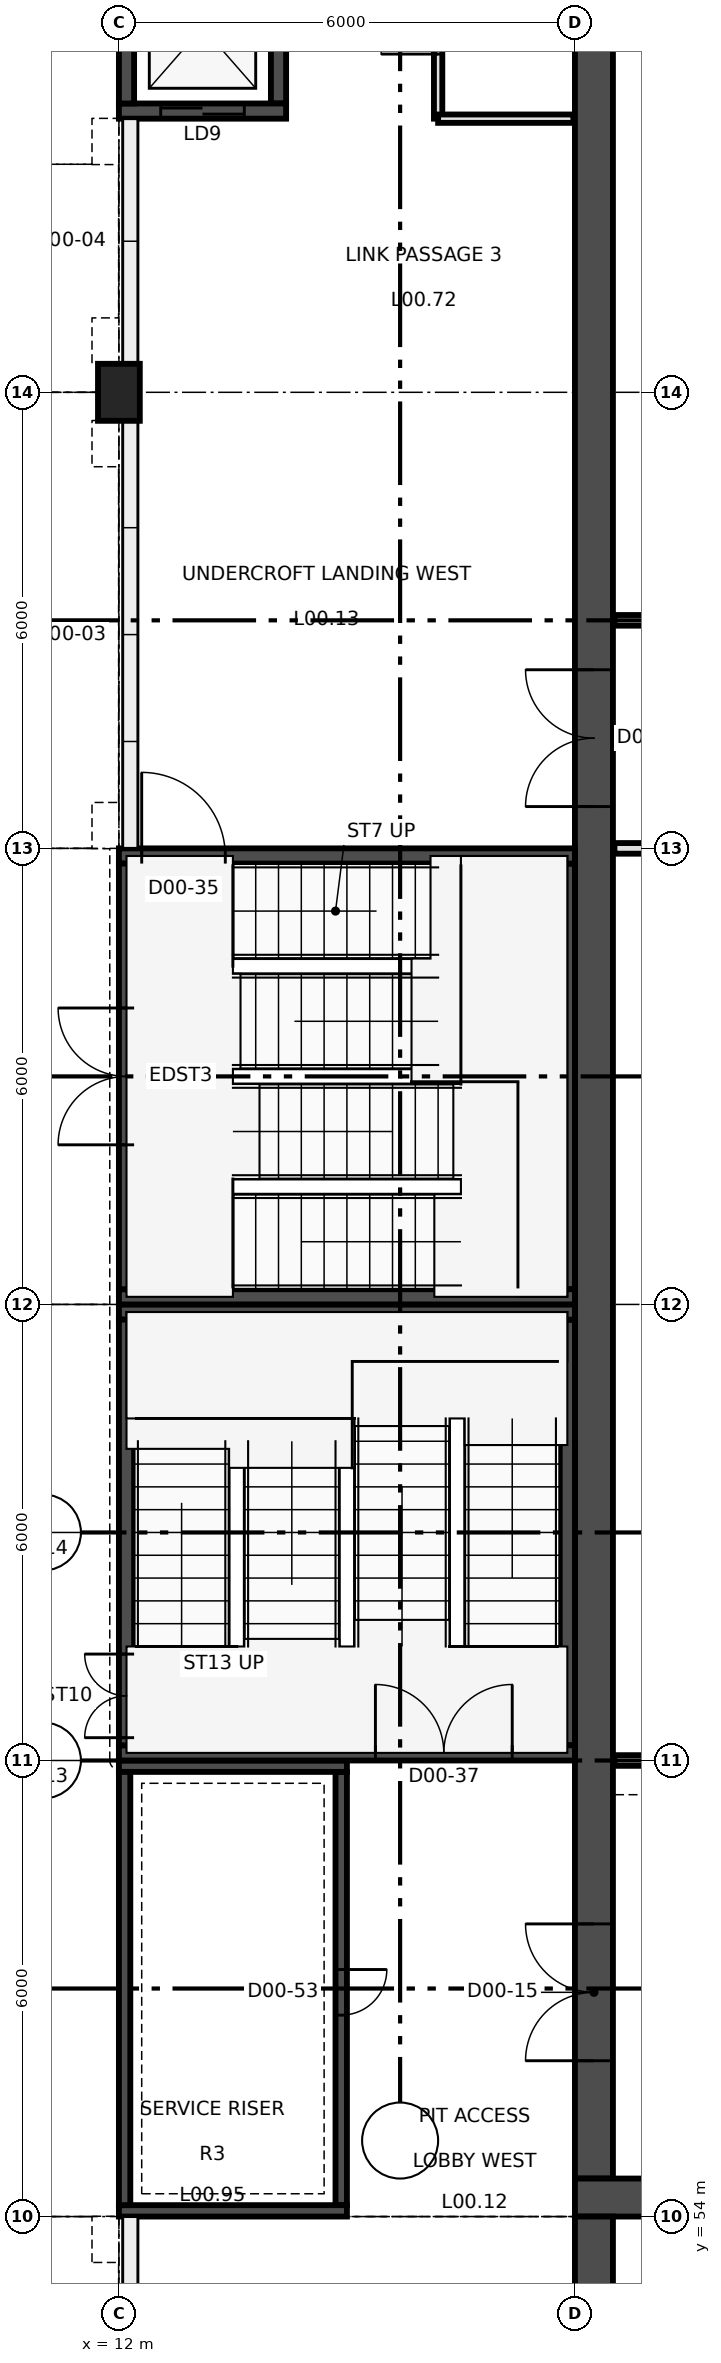
"""IFC4 building model, lengths in metres.
Left out: names, types, materials, properties, quantities, classifications, styles, units other than length and angle.
Written with IfcOpenShell. Run it as: python <this file> out.ifc"""

import sys

from ifc_helpers import new_model, si_unit, direction, frame, frame_2d, origin, origin_2d, place, context, subcontext, project, spatial, rectangle, extrude, element, fill, save


model = new_model("IFC4")
c1 = context("Model", 3, precision=1e-05, world=origin(), true_north=direction((0.0, 1.0)))
c2 = subcontext(c1, "Body", "Model", "MODEL_VIEW")
j1 = project(units=[si_unit("LENGTHUNIT", "METRE"), si_unit("PLANEANGLEUNIT", "RADIAN")], contexts=[c1])
p1 = place(None, origin())
s1 = spatial("IfcSite", under=j1, at=p1, CompositionType="ELEMENT")
p2 = place(p1, origin())
s2 = spatial("IfcBuilding", under=s1, at=p2, CompositionType="ELEMENT")
p3 = place(p2, origin())
s3 = spatial("IfcBuildingStorey", under=s2, at=p3, CompositionType="ELEMENT", Elevation=0.0)
p4 = place(p3, frame((12.0, 78.0, -0.3), z_axis=(0.0, 0.0, 1.0), x_axis=(1.0, 0.0, 0.0)))
e1 = element("IfcColumn", 1, at=p4, inside=s3, PredefinedType="COLUMN", context=c2, shape_type="SweptSolid", body=[
    extrude(rectangle(XDim=0.55, YDim=0.75, at=origin_2d()), origin(), (0.0, 0.0, 1.0), 7.3),
])
p5 = place(p3, frame((12.0, 71.9, -0.3), z_axis=(0.0, 0.0, 1.0), x_axis=(1.0, 0.0, 0.0)))
e2 = element("IfcWall", 2, at=p5, inside=s3, PredefinedType="SHEAR", context=c2, shape_type="SweptSolid", body=[
    extrude(rectangle(XDim=6.0, YDim=0.2, at=frame_2d((3.0, 0.0))), origin(), (0.0, 0.0, 1.0), 7.3),
])
p6 = place(p5, frame((0.3, 0.0, 0.3)))
e3 = element("IfcOpeningElement", 3, at=p6, cuts=e2, PredefinedType="OPENING", context=c2, shape_type="SweptSolid", body=[
    extrude(rectangle(XDim=1.1, YDim=2.2, at=frame_2d((0.55, 1.1))), frame((0.0, 0.11, 0.0), z_axis=(0.0, -1.0, 0.0), x_axis=(1.0, 0.0, 0.0)), (0.0, 0.0, 1.0), 0.22),
])
p7 = place(p3, frame((12.0, 66.1, -0.3), z_axis=(0.0, 0.0, 1.0), x_axis=(1.0, 0.0, 0.0)))
e4 = element("IfcWall", 4, at=p7, inside=s3, PredefinedType="SHEAR", context=c2, shape_type="SweptSolid", body=[
    extrude(rectangle(XDim=6.0, YDim=0.2, at=frame_2d((3.0, 0.0))), origin(), (0.0, 0.0, 1.0), 7.3),
])
p8 = place(p3, frame((12.1, 66.2, -0.3), z_axis=(0.0, 0.0, 1.0), x_axis=(0.0, 1.0, 0.0)))
e5 = element("IfcWall", 5, at=p8, inside=s3, PredefinedType="SHEAR", context=c2, shape_type="SweptSolid", body=[
    extrude(rectangle(XDim=5.6, YDim=0.2, at=frame_2d((2.8, 0.0))), origin(), (0.0, 0.0, 1.0), 7.3),
])
p9 = place(p8, frame((1.9, 0.0, 0.3)))
e6 = element("IfcOpeningElement", 6, at=p9, cuts=e5, PredefinedType="OPENING", context=c2, shape_type="SweptSolid", body=[
    extrude(rectangle(XDim=1.8, YDim=2.4, at=frame_2d((0.9, 1.2))), frame((0.0, 0.11, 0.0), z_axis=(0.0, -1.0, 0.0), x_axis=(1.0, 0.0, 0.0)), (0.0, 0.0, 1.0), 0.22),
])
p10 = place(p3, frame((17.9, 66.2, -0.3), z_axis=(0.0, 0.0, 1.0), x_axis=(0.0, 1.0, 0.0)))
e7 = element("IfcWall", 7, at=p10, inside=s3, PredefinedType="SHEAR", context=c2, shape_type="SweptSolid", body=[
    extrude(rectangle(XDim=5.6, YDim=0.2, at=frame_2d((2.8, 0.0))), origin(), (0.0, 0.0, 1.0), 7.3),
])
p11 = place(p3, frame((12.0, 65.9, -0.3), z_axis=(0.0, 0.0, 1.0), x_axis=(1.0, 0.0, 0.0)))
e8 = element("IfcWall", 8, at=p11, inside=s3, PredefinedType="SHEAR", context=c2, shape_type="SweptSolid", body=[
    extrude(rectangle(XDim=6.0, YDim=0.2, at=frame_2d((3.0, 0.0))), origin(), (0.0, 0.0, 1.0), 7.3),
])
p12 = place(p3, frame((12.0, 60.1, -0.3), z_axis=(0.0, 0.0, 1.0), x_axis=(1.0, 0.0, 0.0)))
e9 = element("IfcWall", 9, at=p12, inside=s3, PredefinedType="SHEAR", context=c2, shape_type="SweptSolid", body=[
    extrude(rectangle(XDim=6.0, YDim=0.2, at=frame_2d((3.0, 0.0))), origin(), (0.0, 0.0, 1.0), 7.3),
])
p13 = place(p12, frame((3.375, 0.0, 0.3)))
e10 = element("IfcOpeningElement", 10, at=p13, cuts=e9, PredefinedType="OPENING", context=c2, shape_type="SweptSolid", body=[
    extrude(rectangle(XDim=1.8, YDim=2.2, at=frame_2d((0.9, 1.1))), frame((0.0, 0.11, 0.0), z_axis=(0.0, -1.0, 0.0), x_axis=(1.0, 0.0, 0.0)), (0.0, 0.0, 1.0), 0.22),
])
p14 = place(p3, frame((12.1, 60.2, -0.3), z_axis=(0.0, 0.0, 1.0), x_axis=(0.0, 1.0, 0.0)))
e11 = element("IfcWall", 11, at=p14, inside=s3, PredefinedType="SHEAR", context=c2, shape_type="SweptSolid", body=[
    extrude(rectangle(XDim=5.6, YDim=0.2, at=frame_2d((2.8, 0.0))), origin(), (0.0, 0.0, 1.0), 7.3),
])
p15 = place(p14, frame((0.1, 0.0, 0.3)))
e12 = element("IfcOpeningElement", 12, at=p15, cuts=e11, PredefinedType="OPENING", context=c2, shape_type="SweptSolid", body=[
    extrude(rectangle(XDim=1.1, YDim=2.4, at=frame_2d((0.55, 1.2))), frame((0.0, 0.11, 0.0), z_axis=(0.0, -1.0, 0.0), x_axis=(1.0, 0.0, 0.0)), (0.0, 0.0, 1.0), 0.22),
])
p16 = place(p3, frame((17.9, 60.2, -0.3), z_axis=(0.0, 0.0, 1.0), x_axis=(0.0, 1.0, 0.0)))
e13 = element("IfcWall", 13, at=p16, inside=s3, PredefinedType="SHEAR", context=c2, shape_type="SweptSolid", body=[
    extrude(rectangle(XDim=5.6, YDim=0.2, at=frame_2d((2.8, 0.0))), origin(), (0.0, 0.0, 1.0), 7.3),
])
p17 = place(p3, frame((12.0, 81.7, -1.4), z_axis=(0.0, 0.0, 1.0), x_axis=(1.0, 0.0, 0.0)))
e14 = element("IfcWall", 14, at=p17, inside=s3, PredefinedType="SHEAR", context=c2, shape_type="SweptSolid", body=[
    extrude(rectangle(XDim=2.2, YDim=0.2, at=frame_2d((1.1, 0.0))), origin(), (0.0, 0.0, 1.0), 8.4),
])
p18 = place(p17, frame((0.55, 0.0, 1.4)))
e15 = element("IfcOpeningElement", 15, at=p18, cuts=e14, PredefinedType="OPENING", context=c2, shape_type="SweptSolid", body=[
    extrude(rectangle(XDim=1.1, YDim=2.1, at=frame_2d((0.55, 1.05))), frame((0.0, 0.11, 0.0), z_axis=(0.0, -1.0, 0.0), x_axis=(1.0, 0.0, 0.0)), (0.0, 0.0, 1.0), 0.22),
])
for number, where, z_axis, x_axis in (
    (16, (12.1, 81.8, -1.4), (0.0, 0.0, 1.0), (0.0, 1.0, 0.0)),
    (17, (14.1, 81.8, -1.4), (0.0, 0.0, 1.0), (0.0, 1.0, 0.0)),
):
    element("IfcWall", number, at=place(p3, frame(where, z_axis=z_axis, x_axis=x_axis)), inside=s3, PredefinedType="SHEAR", context=c2, shape_type="SweptSolid", body=[
        extrude(rectangle(XDim=2.0, YDim=0.2, at=frame_2d((1.0, 0.0))), origin(), (0.0, 0.0, 1.0), 8.4),
    ])
for number, where, z_axis, x_axis in (
    (18, (12.0, 59.925, -0.3), (0.0, 0.0, 1.0), (1.0, 0.0, 0.0)),
    (19, (12.0, 54.075, -0.3), (0.0, 0.0, 1.0), (1.0, 0.0, 0.0)),
):
    element("IfcWall", number, at=place(p3, frame(where, z_axis=z_axis, x_axis=x_axis)), inside=s3, PredefinedType="SHEAR", context=c2, shape_type="SweptSolid", body=[
        extrude(rectangle(XDim=3.0, YDim=0.15, at=frame_2d((1.5, 0.0))), origin(), (0.0, 0.0, 1.0), 7.3),
    ])
p19 = place(p3, frame((12.075, 54.15, -0.3), z_axis=(0.0, 0.0, 1.0), x_axis=(0.0, 1.0, 0.0)))
e20 = element("IfcWall", 20, at=p19, inside=s3, PredefinedType="SHEAR", context=c2, shape_type="SweptSolid", body=[
    extrude(rectangle(XDim=5.7, YDim=0.15, at=frame_2d((2.85, 0.0))), origin(), (0.0, 0.0, 1.0), 7.3),
])
p20 = place(p3, frame((14.925, 54.15, -0.3), z_axis=(0.0, 0.0, 1.0), x_axis=(0.0, 1.0, 0.0)))
e21 = element("IfcWall", 21, at=p20, inside=s3, PredefinedType="SHEAR", context=c2, shape_type="SweptSolid", body=[
    extrude(rectangle(XDim=5.7, YDim=0.15, at=frame_2d((2.85, 0.0))), origin(), (0.0, 0.0, 1.0), 7.3),
])
p21 = place(p20, frame((2.5, 0.0, 0.3)))
e22 = element("IfcOpeningElement", 22, at=p21, cuts=e21, PredefinedType="OPENING", context=c2, shape_type="SweptSolid", body=[
    extrude(rectangle(XDim=0.6, YDim=2.04, at=frame_2d((0.3, 1.02))), frame((0.0, 0.085, 0.0), z_axis=(0.0, -1.0, 0.0), x_axis=(1.0, 0.0, 0.0)), (0.0, 0.0, 1.0), 0.17),
])
p22 = place(p3, frame((18.25, 54.5, -0.3), z_axis=(0.0, 0.0, 1.0), x_axis=(0.0, 1.0, 0.0)))
e23 = element("IfcWall", 23, at=p22, inside=s3, PredefinedType="SHEAR", context=c2, shape_type="SweptSolid", body=[
    extrude(rectangle(XDim=35.5, YDim=0.5, at=frame_2d((17.75, 0.0))), origin(), (0.0, 0.0, 1.0), 7.3),
])
p23 = place(p22, frame((1.55, 0.0, 0.3)))
e24 = element("IfcOpeningElement", 24, at=p23, cuts=e23, PredefinedType="OPENING", context=c2, shape_type="SweptSolid", body=[
    extrude(rectangle(XDim=1.8, YDim=2.1, at=frame_2d((0.9, 1.05))), frame((0.0, 0.26, 0.0), z_axis=(0.0, -1.0, 0.0), x_axis=(1.0, 0.0, 0.0)), (0.0, 0.0, 1.0), 0.52),
])
p24 = place(p22, frame((18.05, 0.0, 0.3)))
e25 = element("IfcOpeningElement", 25, at=p24, cuts=e23, PredefinedType="OPENING", context=c2, shape_type="SweptSolid", body=[
    extrude(rectangle(XDim=1.8, YDim=2.1, at=frame_2d((0.9, 1.05))), frame((0.0, 0.26, 0.0), z_axis=(0.0, -1.0, 0.0), x_axis=(1.0, 0.0, 0.0)), (0.0, 0.0, 1.0), 0.52),
])
p25 = place(p3, frame((18.25, 30.0, -0.3), z_axis=(0.0, 0.0, 1.0), x_axis=(0.0, 1.0, 0.0)))
e26 = element("IfcWall", 26, at=p25, inside=s3, PredefinedType="SHEAR", context=c2, shape_type="SweptSolid", body=[
    extrude(rectangle(XDim=24.0, YDim=0.5, at=frame_2d((12.0, 0.0))), origin(), (0.0, 0.0, 1.0), 7.3),
])
p26 = place(p25, frame((16.95, 0.0, 0.3)))
e27 = element("IfcOpeningElement", 27, at=p26, cuts=e26, PredefinedType="OPENING", context=c2, shape_type="SweptSolid", body=[
    extrude(rectangle(XDim=2.1, YDim=2.4, at=frame_2d((1.05, 1.2))), frame((0.0, 0.26, 0.0), z_axis=(0.0, -1.0, 0.0), x_axis=(1.0, 0.0, 0.0)), (0.0, 0.0, 1.0), 0.52),
])
p27 = place(p25, frame((2.25, 0.0, 0.3)))
e28 = element("IfcOpeningElement", 28, at=p27, cuts=e26, PredefinedType="OPENING", context=c2, shape_type="SweptSolid", body=[
    extrude(rectangle(XDim=1.5, YDim=2.1, at=frame_2d((0.75, 1.05))), frame((0.0, 0.26, 0.0), z_axis=(0.0, -1.0, 0.0), x_axis=(1.0, 0.0, 0.0)), (0.0, 0.0, 1.0), 0.52),
])
p28 = place(p3, frame((18.0, 54.25, -0.3), z_axis=(0.0, 0.0, 1.0), x_axis=(1.0, 0.0, 0.0)))
e29 = element("IfcWall", 29, at=p28, inside=s3, PredefinedType="SHEAR", context=c2, shape_type="SweptSolid", body=[
    extrude(rectangle(XDim=30.0, YDim=0.5, at=frame_2d((15.0, 0.0))), origin(), (0.0, 0.0, 1.0), 7.3),
])
p29 = place(p3, frame((16.2, 81.6, 0.0), z_axis=(0.0, 0.0, 1.0), x_axis=(0.0, 1.0, 0.0)))
e30 = element("IfcWall", 30, at=p29, inside=s3, PredefinedType="PARTITIONING", context=c2, shape_type="SweptSolid", body=[
    extrude(rectangle(XDim=2.4, YDim=0.11, at=frame_2d((1.2, 0.0))), origin(), (0.0, 0.0, 1.0), 6.15),
])
p30 = place(p29, frame((0.85, 0.0, 0.0)))
e31 = element("IfcOpeningElement", 31, at=p30, cuts=e30, PredefinedType="OPENING", context=c2, shape_type="SweptSolid", body=[
    extrude(rectangle(XDim=0.75, YDim=2.04, at=frame_2d((0.375, 1.02))), frame((0.0, 0.065, 0.0), z_axis=(0.0, -1.0, 0.0), x_axis=(1.0, 0.0, 0.0)), (0.0, 0.0, 1.0), 0.13),
])
p31 = place(p3, frame((16.2, 81.6, 0.0), z_axis=(0.0, 0.0, 1.0), x_axis=(1.0, 0.0, 0.0)))
e32 = element("IfcWall", 32, at=p31, inside=s3, PredefinedType="PARTITIONING", context=c2, shape_type="SweptSolid", body=[
    extrude(rectangle(XDim=1.78, YDim=0.11, at=frame_2d((0.89, 0.0))), origin(), (0.0, 0.0, 1.0), 6.75),
])
p32 = place(p3, frame((18.52, 60.0, 0.0), z_axis=(0.0, 0.0, 1.0), x_axis=(1.0, 0.0, 0.0)))
e33 = element("IfcWall", 33, at=p32, inside=s3, PredefinedType="PARTITIONING", context=c2, shape_type="SweptSolid", body=[
    extrude(rectangle(XDim=28.96, YDim=0.14, at=frame_2d((14.48, 0.0))), origin(), (0.0, 0.0, 1.0), 2.964),
])
p33 = place(p3, frame((18.52, 75.0, 0.0), z_axis=(0.0, 0.0, 1.0), x_axis=(1.0, 0.0, 0.0)))
e34 = element("IfcWall", 34, at=p33, inside=s3, PredefinedType="PARTITIONING", context=c2, shape_type="SweptSolid", body=[
    extrude(rectangle(XDim=14.48, YDim=0.14, at=frame_2d((7.24, 0.0))), origin(), (0.0, 0.0, 1.0), 5.5),
])
p34 = place(p33, frame((6.03, 0.0, 0.0)))
e35 = element("IfcOpeningElement", 35, at=p34, cuts=e34, PredefinedType="OPENING", context=c2, shape_type="SweptSolid", body=[
    extrude(rectangle(XDim=1.8, YDim=2.1, at=frame_2d((0.9, 1.05))), frame((0.0, 0.08, 0.0), z_axis=(0.0, -1.0, 0.0), x_axis=(1.0, 0.0, 0.0)), (0.0, 0.0, 1.0), 0.16),
])
p35 = place(p3, frame((18.52, 72.0, 0.0), z_axis=(0.0, 0.0, 1.0), x_axis=(1.0, 0.0, 0.0)))
e36 = element("IfcWall", 36, at=p35, inside=s3, PredefinedType="PARTITIONING", context=c2, shape_type="SweptSolid", body=[
    extrude(rectangle(XDim=11.48, YDim=0.14, at=frame_2d((5.74, 0.0))), origin(), (0.0, 0.0, 1.0), 3.924),
])
p36 = place(p35, frame((4.93, 0.0, 0.0)))
e37 = element("IfcOpeningElement", 37, at=p36, cuts=e36, PredefinedType="OPENING", context=c2, shape_type="SweptSolid", body=[
    extrude(rectangle(XDim=1.0, YDim=2.1, at=frame_2d((0.5, 1.05))), frame((0.0, 0.08, 0.0), z_axis=(0.0, -1.0, 0.0), x_axis=(1.0, 0.0, 0.0)), (0.0, 0.0, 1.0), 0.16),
])
p37 = place(p9, origin())
e38 = element("IfcDoor", 38, at=p37, inside=s3, OperationType="DOUBLE_DOOR_SINGLE_SWING", PredefinedType="DOOR", context=c2, shape_type="SweptSolid", body=[
    extrude(rectangle(XDim=1.8, YDim=2.4, at=frame_2d((0.9, 1.2))), frame((0.0, 0.025, 0.0), z_axis=(0.0, -1.0, 0.0), x_axis=(1.0, 0.0, 0.0)), (0.0, 0.0, 1.0), 0.05),
])
fill(e6, e38)
p38 = place(p15, origin())
e39 = element("IfcDoor", 39, at=p38, inside=s3, OperationType="DOUBLE_DOOR_SINGLE_SWING", PredefinedType="DOOR", context=c2, shape_type="SweptSolid", body=[
    extrude(rectangle(XDim=1.1, YDim=2.4, at=frame_2d((0.55, 1.2))), frame((0.0, 0.025, 0.0), z_axis=(0.0, -1.0, 0.0), x_axis=(1.0, 0.0, 0.0)), (0.0, 0.0, 1.0), 0.05),
])
fill(e12, e39)
p39 = place(p23, frame((1.8, 0.0, 0.0), z_axis=(0.0, 0.0, 1.0), x_axis=(-1.0, 0.0, 0.0)))
e40 = element("IfcDoor", 40, at=p39, inside=s3, OperationType="DOUBLE_DOOR_SINGLE_SWING", PredefinedType="DOOR", context=c2, shape_type="SweptSolid", body=[
    extrude(rectangle(XDim=1.8, YDim=2.1, at=frame_2d((0.9, 1.05))), frame((0.0, 0.025, 0.0), z_axis=(0.0, -1.0, 0.0), x_axis=(1.0, 0.0, 0.0)), (0.0, 0.0, 1.0), 0.05),
])
fill(e24, e40)
p40 = place(p6, frame((1.1, 0.0, 0.0), z_axis=(0.0, 0.0, 1.0), x_axis=(-1.0, 0.0, 0.0)))
e41 = element("IfcDoor", 41, at=p40, inside=s3, OperationType="SINGLE_SWING_LEFT", PredefinedType="DOOR", context=c2, shape_type="SweptSolid", body=[
    extrude(rectangle(XDim=1.1, YDim=2.2, at=frame_2d((0.55, 1.1))), frame((0.0, 0.025, 0.0), z_axis=(0.0, -1.0, 0.0), x_axis=(1.0, 0.0, 0.0)), (0.0, 0.0, 1.0), 0.05),
])
fill(e3, e41)
p41 = place(p13, origin())
e42 = element("IfcDoor", 42, at=p41, inside=s3, OperationType="DOUBLE_DOOR_SINGLE_SWING", PredefinedType="DOOR", context=c2, shape_type="SweptSolid", body=[
    extrude(rectangle(XDim=1.8, YDim=2.2, at=frame_2d((0.9, 1.1))), frame((0.0, 0.025, 0.0), z_axis=(0.0, -1.0, 0.0), x_axis=(1.0, 0.0, 0.0)), (0.0, 0.0, 1.0), 0.05),
])
fill(e10, e42)
p42 = place(p30, frame((0.75, 0.0, 0.0), z_axis=(0.0, 0.0, 1.0), x_axis=(-1.0, 0.0, 0.0)))
e43 = element("IfcDoor", 43, at=p42, inside=s3, OperationType="SINGLE_SWING_LEFT", PredefinedType="DOOR", context=c2, shape_type="SweptSolid", body=[
    extrude(rectangle(XDim=0.75, YDim=2.04, at=frame_2d((0.375, 1.02))), frame((0.0, 0.025, 0.0), z_axis=(0.0, -1.0, 0.0), x_axis=(1.0, 0.0, 0.0)), (0.0, 0.0, 1.0), 0.05),
])
fill(e31, e43)
p43 = place(p21, origin())
e44 = element("IfcDoor", 44, at=p43, inside=s3, OperationType="SINGLE_SWING_RIGHT", PredefinedType="DOOR", context=c2, shape_type="SweptSolid", body=[
    extrude(rectangle(XDim=0.6, YDim=2.04, at=frame_2d((0.3, 1.02))), frame((0.0, 0.025, 0.0), z_axis=(0.0, -1.0, 0.0), x_axis=(1.0, 0.0, 0.0)), (0.0, 0.0, 1.0), 0.05),
])
fill(e22, e44)
p44 = place(p24, frame((1.8, 0.0, 0.0), z_axis=(0.0, 0.0, 1.0), x_axis=(-1.0, 0.0, 0.0)))
e45 = element("IfcDoor", 45, at=p44, inside=s3, OperationType="DOUBLE_DOOR_SINGLE_SWING", PredefinedType="DOOR", context=c2, shape_type="SweptSolid", body=[
    extrude(rectangle(XDim=1.8, YDim=2.1, at=frame_2d((0.9, 1.05))), frame((0.0, 0.025, 0.0), z_axis=(0.0, -1.0, 0.0), x_axis=(1.0, 0.0, 0.0)), (0.0, 0.0, 1.0), 0.05),
])
fill(e25, e45)
p45 = place(p18, origin())
e46 = element("IfcDoor", 46, at=p45, inside=s3, OperationType="DOUBLE_DOOR_SLIDING", PredefinedType="DOOR", context=c2, shape_type="SweptSolid", body=[
    extrude(rectangle(XDim=1.1, YDim=2.1, at=frame_2d((0.55, 1.05))), frame((0.0, 0.025, 0.0), z_axis=(0.0, -1.0, 0.0), x_axis=(1.0, 0.0, 0.0)), (0.0, 0.0, 1.0), 0.05),
])
fill(e15, e46)
save(model, sys.argv[1])
